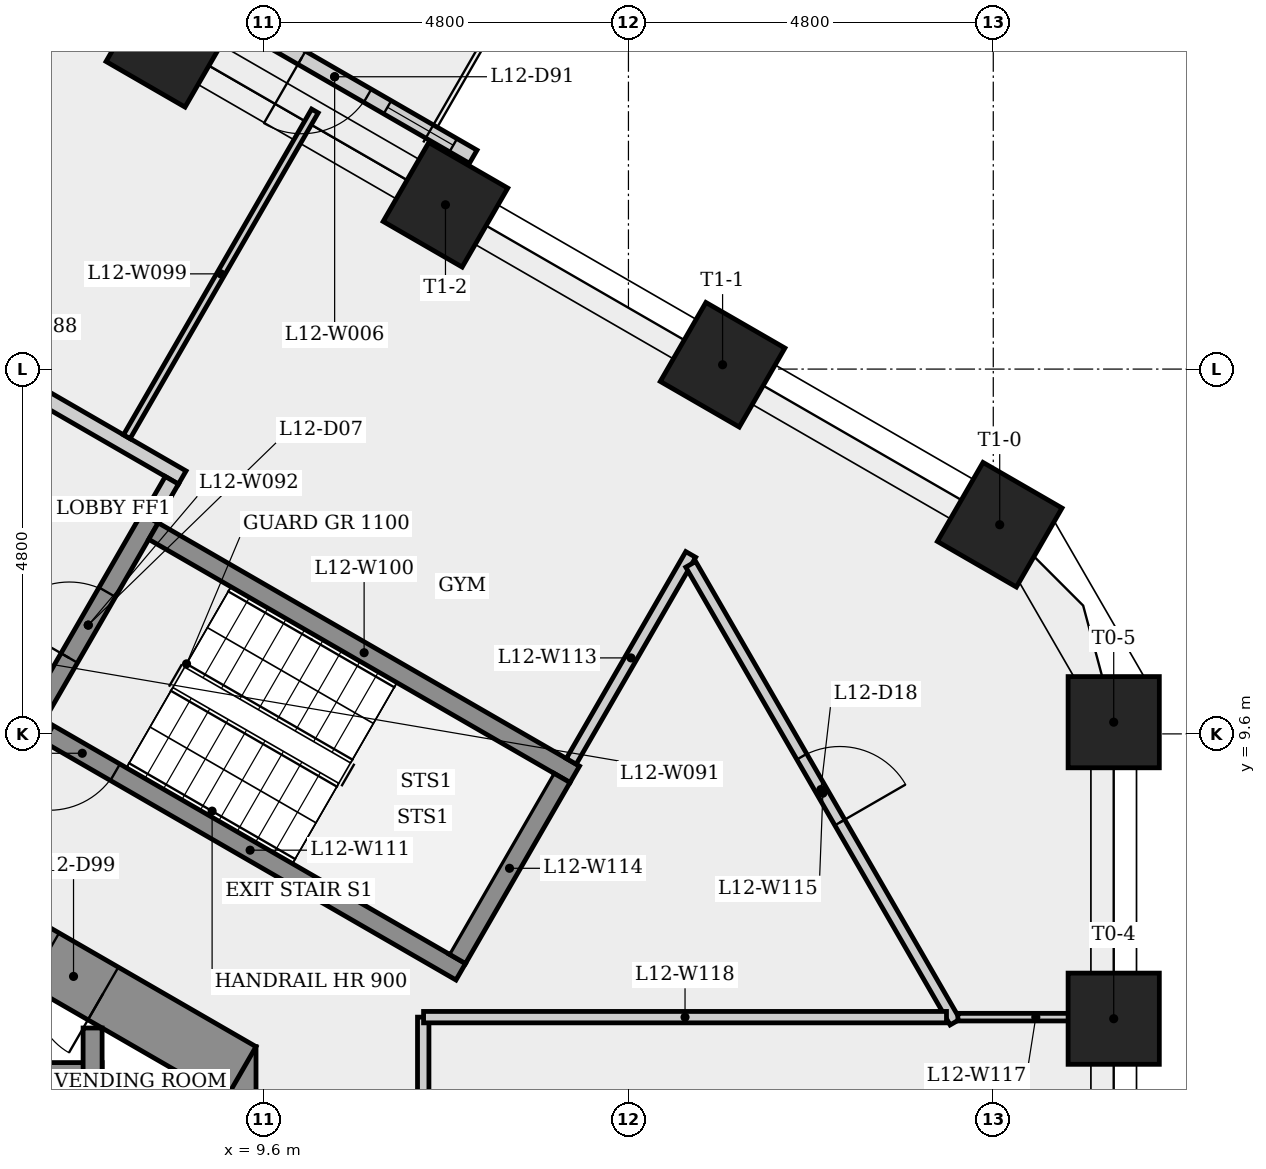
"""IFC4 building model, lengths in metres.
Left out: names, types, materials, properties, quantities, classifications, styles, units other than length and angle.
Written with IfcOpenShell. Run it as: python <this file> out.ifc"""

import sys

from ifc_helpers import new_model, si_unit, direction, frame, frame_2d, origin, origin_2d, place, context, subcontext, project, spatial, rectangle, extrude, element, fill, save


model = new_model("IFC4")
c1 = context("Model", 3, precision=1e-05, world=origin(), true_north=direction((0.0, 1.0)))
c2 = subcontext(c1, "Body", "Model", "MODEL_VIEW")
j1 = project(units=[si_unit("LENGTHUNIT", "METRE"), si_unit("PLANEANGLEUNIT", "RADIAN")], contexts=[c1])
p1 = place(None, origin())
s1 = spatial("IfcSite", under=j1, at=p1, CompositionType="ELEMENT")
p2 = place(p1, origin())
s2 = spatial("IfcBuilding", under=s1, at=p2, CompositionType="ELEMENT")
p3 = place(p2, frame((0.0, 0.0, 49.3)))
s3 = spatial("IfcBuildingStorey", under=s2, at=p3, CompositionType="ELEMENT", Elevation=49.3)
p4 = place(p3, frame((9.1, -5.485, 0.0), z_axis=(0.0, 0.0, 1.0), x_axis=(0.0, 1.0, 0.0)))
e1 = element("IfcWall", 1, at=p4, inside=s3, PredefinedType="SHEAR", context=c2, shape_type="SweptSolid", body=[
    extrude(rectangle(XDim=10.97, YDim=0.8, at=frame_2d((5.485, 0.0))), origin(), (0.0, 0.0, 1.0), 3.4),
])
p5 = place(p4, frame((4.685, 0.0, 0.0)))
e2 = element("IfcOpeningElement", 2, at=p5, cuts=e1, PredefinedType="OPENING", context=c2, shape_type="SweptSolid", body=[
    extrude(rectangle(XDim=1.6, YDim=2.1, at=frame_2d((0.8, 1.05))), frame((0.0, 0.41, 0.0), z_axis=(0.0, -1.0, 0.0), x_axis=(1.0, 0.0, 0.0)), (0.0, 0.0, 1.0), 0.82),
])
p6 = place(p3, frame((9.3, 5.138, 0.0), z_axis=(0.0, 0.0, 1.0), x_axis=(-0.866023993627, 0.500002442456, 0.0)))
e3 = element("IfcWall", 3, at=p6, inside=s3, PredefinedType="SHEAR", context=c2, shape_type="SweptSolid", body=[
    extrude(rectangle(XDim=10.97, YDim=0.8, at=frame_2d((5.485, 0.0))), origin(), (0.0, 0.0, 1.0), 3.4),
])
p7 = place(p6, frame((8.326, 0.0, 0.0)))
e4 = element("IfcOpeningElement", 4, at=p7, cuts=e3, PredefinedType="OPENING", context=c2, shape_type="SweptSolid", body=[
    extrude(rectangle(XDim=0.9, YDim=2.1, at=frame_2d((0.45, 1.05))), frame((0.0, 0.41, 0.0), z_axis=(0.0, -1.0, 0.0), x_axis=(1.0, 0.0, 0.0)), (0.0, 0.0, 1.0), 0.82),
])
p8 = place(p6, frame((2.091, 0.0, 0.0)))
e5 = element("IfcOpeningElement", 5, at=p8, cuts=e3, PredefinedType="OPENING", context=c2, shape_type="SweptSolid", body=[
    extrude(rectangle(XDim=0.9, YDim=2.1, at=frame_2d((0.45, 1.05))), frame((0.0, 0.41, 0.0), z_axis=(0.0, -1.0, 0.0), x_axis=(1.0, 0.0, 0.0)), (0.0, 0.0, 1.0), 0.82),
])
for number, where, z_axis, x_axis in (
    (6, (20.785, 5.852, 0.0), (0.0, 0.0, 1.0), (1.0, 0.0, 0.0)),
    (7, (20.785, 9.754, 0.0), (0.0, 0.0, 1.0), (1.0, 0.0, 0.0)),
    (8, (19.285, 12.352, 0.0), (0.0, 0.0, 1.0), (0.5, 0.866, 0.0)),
    (9, (15.639, 14.457, 0.0), (0.0, 0.0, 1.0), (0.5, 0.866, 0.0)),
    (10, (11.993, 16.562, 0.0), (0.0, 0.0, 1.0), (0.5, 0.866, 0.0)),
    (11, (8.347, 18.667, 0.0), (0.0, 0.0, 1.0), (0.5, 0.866, 0.0)),
):
    element("IfcColumn", number, at=place(p3, frame(where, z_axis=z_axis, x_axis=x_axis)), inside=s3, PredefinedType="COLUMN", context=c2, shape_type="SweptSolid", body=[
        extrude(rectangle(XDim=1.2, YDim=1.2, at=origin_2d()), origin(), (0.0, 0.0, 1.0), 3.4),
    ])
p9 = place(p3, frame((12.357, 17.194, 0.0), z_axis=(0.0, 0.0, 1.0), x_axis=(-0.865989532063, 0.500062126497, 0.0)))
e12 = element("IfcWall", 12, at=p9, inside=s3, PredefinedType="SOLIDWALL", context=c2, shape_type="SweptSolid", body=[
    extrude(rectangle(XDim=4.21, YDim=0.2, at=frame_2d((2.105, 0.0))), origin(), (0.0, 0.0, 1.0), 3.4),
])
p10 = place(p9, frame((1.605, 0.0, 0.0)))
e13 = element("IfcOpeningElement", 13, at=p10, cuts=e12, PredefinedType="OPENING", context=c2, shape_type="SweptSolid", body=[
    extrude(rectangle(XDim=1.0, YDim=2.4, at=frame_2d((0.5, 1.2))), frame((0.0, 0.11, 0.0), z_axis=(0.0, -1.0, 0.0), x_axis=(1.0, 0.0, 0.0)), (0.0, 0.0, 1.0), 0.22),
])
p11 = place(p9, frame((0.302, 0.0, 0.9)))
e14 = element("IfcOpeningElement", 14, at=p11, cuts=e12, PredefinedType="OPENING", context=c2, shape_type="SweptSolid", body=[
    extrude(rectangle(XDim=1.0, YDim=1.5, at=frame_2d((0.5, 0.75))), frame((0.0, 0.11, 0.0), z_axis=(0.0, -1.0, 0.0), x_axis=(1.0, 0.0, 0.0)), (0.0, 0.0, 1.0), 0.22),
])
p12 = place(p9, frame((2.907, 0.0, 0.9)))
e15 = element("IfcOpeningElement", 15, at=p12, cuts=e12, PredefinedType="OPENING", context=c2, shape_type="SweptSolid", body=[
    extrude(rectangle(XDim=1.0, YDim=1.5, at=frame_2d((0.5, 0.75))), frame((0.0, 0.11, 0.0), z_axis=(0.0, -1.0, 0.0), x_axis=(1.0, 0.0, 0.0)), (0.0, 0.0, 1.0), 0.22),
])
p13 = place(p3, frame((-7.225, 5.15, 0.0), z_axis=(0.0, 0.0, 1.0), x_axis=(1.0, 0.0, 0.0)))
e16 = element("IfcWall", 16, at=p13, inside=s3, PredefinedType="SHEAR", context=c2, shape_type="SweptSolid", body=[
    extrude(rectangle(XDim=14.7, YDim=0.25, at=frame_2d((7.35, 0.0))), origin(), (0.0, 0.0, 1.0), 3.05),
])
p14 = place(p3, frame((4.459, 15.323, 0.0), z_axis=(0.0, 0.0, 1.0), x_axis=(0.866016039709, -0.500016218704, 0.0)))
e17 = element("IfcWall", 17, at=p14, inside=s3, PredefinedType="PARTITIONING", context=c2, shape_type="SweptSolid", body=[
    extrude(rectangle(XDim=4.7, YDim=0.2, at=frame_2d((2.35, 0.0))), origin(), (0.0, 0.0, 1.0), 3.05),
])
p15 = place(p3, frame((6.48, 9.624, 0.0), z_axis=(0.0, 0.0, 1.0), x_axis=(0.500017246033, 0.866015446554, 0.0)))
e18 = element("IfcWall", 18, at=p15, inside=s3, PredefinedType="SHEAR", context=c2, shape_type="SweptSolid", body=[
    extrude(rectangle(XDim=3.25, YDim=0.25, at=frame_2d((1.625, 0.0))), origin(), (0.0, 0.0, 1.0), 3.05),
])
p16 = place(p15, frame((1.125, 0.0, 0.0)))
e19 = element("IfcOpeningElement", 19, at=p16, cuts=e18, PredefinedType="OPENING", context=c2, shape_type="SweptSolid", body=[
    extrude(rectangle(XDim=1.0, YDim=2.1, at=frame_2d((0.5, 1.05))), frame((0.0, 0.135, 0.0), z_axis=(0.0, -1.0, 0.0), x_axis=(1.0, 0.0, 0.0)), (0.0, 0.0, 1.0), 0.27),
])
p17 = place(p3, frame((7.35, 5.73, 0.0), z_axis=(0.0, 0.0, 1.0), x_axis=(0.0, -1.0, 0.0)))
e20 = element("IfcWall", 20, at=p17, inside=s3, PredefinedType="SHEAR", context=c2, shape_type="SweptSolid", body=[
    extrude(rectangle(XDim=3.805, YDim=0.25, at=frame_2d((1.903, 0.0))), origin(), (0.0, 0.0, 1.0), 3.05),
])
p18 = place(p3, frame((7.8, 13.51, 0.0), z_axis=(0.0, 0.0, 1.0), x_axis=(0.500001430823, 0.866024577697, 0.0)))
e21 = element("IfcWall", 21, at=p18, inside=s3, PredefinedType="PARTITIONING", context=c2, shape_type="SweptSolid", body=[
    extrude(rectangle(XDim=4.949, YDim=0.1, at=frame_2d((2.475, 0.0))), origin(), (0.0, 0.0, 1.0), 3.05),
])
p19 = place(p3, frame((8.151, 12.268, 0.0), z_axis=(0.0, 0.0, 1.0), x_axis=(0.866025499775, -0.499999833739, 0.0)))
e22 = element("IfcWall", 22, at=p19, inside=s3, PredefinedType="SHEAR", context=c2, shape_type="SweptSolid", body=[
    extrude(rectangle(XDim=6.4, YDim=0.25, at=frame_2d((3.2, 0.0))), origin(), (0.0, 0.0, 1.0), 3.05),
])
p20 = place(p3, frame((8.393, 12.937, 0.0), z_axis=(0.0, 0.0, 1.0), x_axis=(-0.500065409566, -0.86598763626, 0.0)))
e23 = element("IfcWall", 23, at=p20, inside=s3, PredefinedType="PARTITIONING", context=c2, shape_type="SweptSolid", body=[
    extrude(rectangle(XDim=0.575, YDim=0.2, at=frame_2d((0.288, 0.0))), origin(), (0.0, 0.0, 1.0), 3.05),
])
p21 = place(p3, frame((11.7, 5.873, 0.0), z_axis=(0.0, 0.0, 1.0), x_axis=(0.0, -1.0, 0.0)))
e24 = element("IfcWall", 24, at=p21, inside=s3, PredefinedType="PARTITIONING", context=c2, shape_type="SweptSolid", body=[
    extrude(rectangle(XDim=11.671, YDim=0.15, at=frame_2d((5.835, 0.0))), origin(), (0.0, 0.0, 1.0), 3.05),
])
p22 = place(p21, frame((5.336, 0.0, 0.0)))
e25 = element("IfcOpeningElement", 25, at=p22, cuts=e24, PredefinedType="OPENING", context=c2, shape_type="SweptSolid", body=[
    extrude(rectangle(XDim=1.0, YDim=2.1, at=frame_2d((0.5, 1.05))), frame((0.0, 0.085, 0.0), z_axis=(0.0, -1.0, 0.0), x_axis=(1.0, 0.0, 0.0)), (0.0, 0.0, 1.0), 0.17),
])
p23 = place(p3, frame((12.194, 6.47, 0.0), z_axis=(0.0, 0.0, 1.0), x_axis=(-0.866025499775, 0.499999833739, 0.0)))
e26 = element("IfcWall", 26, at=p23, inside=s3, PredefinedType="SHEAR", context=c2, shape_type="SweptSolid", body=[
    extrude(rectangle(XDim=6.4, YDim=0.25, at=frame_2d((3.2, 0.0))), origin(), (0.0, 0.0, 1.0), 3.05),
])
p24 = place(p23, frame((5.25, 0.0, 0.0)))
e27 = element("IfcOpeningElement", 27, at=p24, cuts=e26, PredefinedType="OPENING", context=c2, shape_type="SweptSolid", body=[
    extrude(rectangle(XDim=1.0, YDim=2.1, at=frame_2d((0.5, 1.05))), frame((0.0, 0.135, 0.0), z_axis=(0.0, -1.0, 0.0), x_axis=(1.0, 0.0, 0.0)), (0.0, 0.0, 1.0), 0.27),
])
p25 = place(p3, frame((13.648, 9.239, 0.0), z_axis=(0.0, 0.0, 1.0), x_axis=(0.500031717574, 0.86600709086, 0.0)))
e28 = element("IfcWall", 28, at=p25, inside=s3, PredefinedType="PARTITIONING", context=c2, shape_type="SweptSolid", body=[
    extrude(rectangle(XDim=3.143, YDim=0.15, at=frame_2d((1.572, 0.0))), origin(), (0.0, 0.0, 1.0), 3.05),
])
p26 = place(p3, frame((13.523, 9.022, 0.0), z_axis=(0.0, 0.0, 1.0), x_axis=(-0.500034990121, -0.866005201286, 0.0)))
e29 = element("IfcWall", 29, at=p26, inside=s3, PredefinedType="SHEAR", context=c2, shape_type="SweptSolid", body=[
    extrude(rectangle(XDim=2.75, YDim=0.25, at=frame_2d((1.375, 0.0))), origin(), (0.0, 0.0, 1.0), 3.05),
])
p27 = place(p3, frame((15.219, 11.831, 0.0), z_axis=(0.0, 0.0, 1.0), x_axis=(0.50002024234, -0.866013716549, 0.0)))
e30 = element("IfcWall", 30, at=p27, inside=s3, PredefinedType="PARTITIONING", context=c2, shape_type="SweptSolid", body=[
    extrude(rectangle(XDim=6.955, YDim=0.15, at=frame_2d((3.478, 0.0))), origin(), (0.0, 0.0, 1.0), 3.05),
])
p28 = place(p27, frame((2.923, 0.0, 0.0)))
e31 = element("IfcOpeningElement", 31, at=p28, cuts=e30, PredefinedType="OPENING", context=c2, shape_type="SweptSolid", body=[
    extrude(rectangle(XDim=1.0, YDim=2.1, at=frame_2d((0.5, 1.05))), frame((0.0, 0.085, 0.0), z_axis=(0.0, -1.0, 0.0), x_axis=(1.0, 0.0, 0.0)), (0.0, 0.0, 1.0), 0.17),
])
p29 = place(p3, frame((18.734, 5.873, 0.0), z_axis=(0.0, 0.0, 1.0), x_axis=(1.0, 0.0, 0.0)))
e32 = element("IfcWall", 32, at=p29, inside=s3, PredefinedType="PARTITIONING", context=c2, shape_type="SweptSolid", body=[
    extrude(rectangle(XDim=2.05, YDim=0.1, at=frame_2d((1.025, 0.0))), origin(), (0.0, 0.0, 1.0), 3.05),
])
p30 = place(p3, frame((18.584, 5.873, 0.0), z_axis=(0.0, 0.0, 1.0), x_axis=(-1.0, 0.0, 0.0)))
e33 = element("IfcWall", 33, at=p30, inside=s3, PredefinedType="PARTITIONING", context=c2, shape_type="SweptSolid", body=[
    extrude(rectangle(XDim=6.88, YDim=0.15, at=frame_2d((3.44, 0.0))), origin(), (0.0, 0.0, 1.0), 3.05),
])
p31 = place(p10, origin())
e34 = element("IfcDoor", 34, at=p31, inside=s3, OperationType="SINGLE_SWING_RIGHT", PredefinedType="DOOR", context=c2, shape_type="SweptSolid", body=[
    extrude(rectangle(XDim=1.0, YDim=2.4, at=frame_2d((0.5, 1.2))), frame((0.0, 0.025, 0.0), z_axis=(0.0, -1.0, 0.0), x_axis=(1.0, 0.0, 0.0)), (0.0, 0.0, 1.0), 0.05),
])
fill(e13, e34)
p32 = place(p11, origin())
e35 = element("IfcWindow", 35, at=p32, inside=s3, PartitioningType="SINGLE_PANEL", PredefinedType="WINDOW", context=c2, shape_type="SweptSolid", body=[
    extrude(rectangle(XDim=1.0, YDim=1.5, at=frame_2d((0.5, 0.75))), frame((0.0, 0.03, 0.0), z_axis=(0.0, -1.0, 0.0), x_axis=(1.0, 0.0, 0.0)), (0.0, 0.0, 1.0), 0.06),
])
fill(e14, e35)
p33 = place(p24, origin())
e36 = element("IfcDoor", 36, at=p33, inside=s3, OperationType="SINGLE_SWING_RIGHT", PredefinedType="DOOR", context=c2, shape_type="SweptSolid", body=[
    extrude(rectangle(XDim=1.0, YDim=2.1, at=frame_2d((0.5, 1.05))), frame((0.0, 0.025, 0.0), z_axis=(0.0, -1.0, 0.0), x_axis=(1.0, 0.0, 0.0)), (0.0, 0.0, 1.0), 0.05),
])
fill(e27, e36)
p34 = place(p16, origin())
e37 = element("IfcDoor", 37, at=p34, inside=s3, OperationType="SINGLE_SWING_LEFT", PredefinedType="DOOR", context=c2, shape_type="SweptSolid", body=[
    extrude(rectangle(XDim=1.0, YDim=2.1, at=frame_2d((0.5, 1.05))), frame((0.0, 0.025, 0.0), z_axis=(0.0, -1.0, 0.0), x_axis=(1.0, 0.0, 0.0)), (0.0, 0.0, 1.0), 0.05),
])
fill(e19, e37)
p35 = place(p28, origin())
e38 = element("IfcDoor", 38, at=p35, inside=s3, OperationType="SINGLE_SWING_RIGHT", PredefinedType="DOOR", context=c2, shape_type="SweptSolid", body=[
    extrude(rectangle(XDim=1.0, YDim=2.1, at=frame_2d((0.5, 1.05))), frame((0.0, 0.025, 0.0), z_axis=(0.0, -1.0, 0.0), x_axis=(1.0, 0.0, 0.0)), (0.0, 0.0, 1.0), 0.05),
])
fill(e31, e38)
p36 = place(p8, origin())
e39 = element("IfcDoor", 39, at=p36, inside=s3, OperationType="SINGLE_SWING_LEFT", PredefinedType="DOOR", context=c2, shape_type="SweptSolid", body=[
    extrude(rectangle(XDim=0.9, YDim=2.1, at=frame_2d((0.45, 1.05))), frame((0.0, 0.025, 0.0), z_axis=(0.0, -1.0, 0.0), x_axis=(1.0, 0.0, 0.0)), (0.0, 0.0, 1.0), 0.05),
])
fill(e5, e39)
save(model, sys.argv[1])
